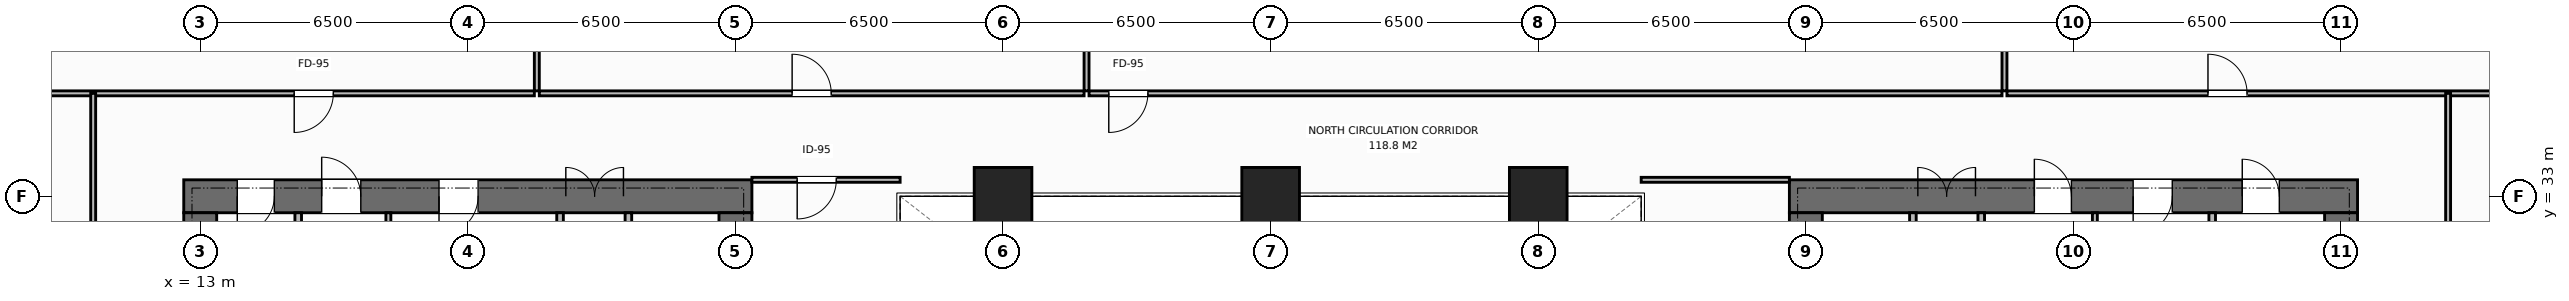
"""IFC4 building model, lengths in metres.
Left out: names, types, materials, properties, quantities, classifications, styles, units other than length and angle.
Written with IfcOpenShell. Run it as: python <this file> out.ifc"""

import sys

from ifc_helpers import new_model, si_unit, direction, frame, frame_2d, origin, origin_2d, place, context, subcontext, project, spatial, rectangle, extrude, element, fill, save


model = new_model("IFC4")
c1 = context("Model", 3, precision=1e-05, world=origin(), true_north=direction((0.0, 1.0)))
c2 = subcontext(c1, "Body", "Model", "MODEL_VIEW")
j1 = project(units=[si_unit("LENGTHUNIT", "METRE"), si_unit("PLANEANGLEUNIT", "RADIAN")], contexts=[c1])
p1 = place(None, origin())
s1 = spatial("IfcSite", under=j1, at=p1, CompositionType="ELEMENT")
p2 = place(p1, origin())
s2 = spatial("IfcBuilding", under=s1, at=p2, CompositionType="ELEMENT")
p3 = place(p2, frame((0.0, 0.0, 62.0)))
s3 = spatial("IfcBuildingStorey", under=s2, at=p3, CompositionType="ELEMENT", Elevation=62.0)
p4 = place(p3, frame((12.6, 33.0, 0.0), z_axis=(0.0, 0.0, 1.0), x_axis=(1.0, 0.0, 0.0)))
e1 = element("IfcWall", 1, at=p4, inside=s3, PredefinedType="SHEAR", context=c2, shape_type="SweptSolid", body=[
    extrude(rectangle(XDim=13.8, YDim=0.8, at=frame_2d((6.9, 0.0))), origin(), (0.0, 0.0, 1.0), 3.8),
])
p5 = place(p4, frame((1.3, 0.0, 0.0)))
e2 = element("IfcOpeningElement", 2, at=p5, cuts=e1, PredefinedType="OPENING", context=c2, shape_type="SweptSolid", body=[
    extrude(rectangle(XDim=0.9, YDim=2.15, at=frame_2d((0.45, 1.075))), frame((0.0, 0.41, 0.0), z_axis=(0.0, -1.0, 0.0), x_axis=(1.0, 0.0, 0.0)), (0.0, 0.0, 1.0), 0.82),
])
p6 = place(p4, frame((3.35, 0.0, 0.0)))
e3 = element("IfcOpeningElement", 3, at=p6, cuts=e1, PredefinedType="OPENING", context=c2, shape_type="SweptSolid", body=[
    extrude(rectangle(XDim=0.95, YDim=2.15, at=frame_2d((0.475, 1.075))), frame((0.0, 0.41, 0.0), z_axis=(0.0, -1.0, 0.0), x_axis=(1.0, 0.0, 0.0)), (0.0, 0.0, 1.0), 0.82),
])
p7 = place(p4, frame((6.2, 0.0, 0.0)))
e4 = element("IfcOpeningElement", 4, at=p7, cuts=e1, PredefinedType="OPENING", context=c2, shape_type="SweptSolid", body=[
    extrude(rectangle(XDim=0.95, YDim=2.15, at=frame_2d((0.475, 1.075))), frame((0.0, 0.41, 0.0), z_axis=(0.0, -1.0, 0.0), x_axis=(1.0, 0.0, 0.0)), (0.0, 0.0, 1.0), 0.82),
])
p8 = place(p4, frame((9.28, 0.0, 0.0)))
e5 = element("IfcOpeningElement", 5, at=p8, cuts=e1, PredefinedType="OPENING", context=c2, shape_type="SweptSolid", body=[
    extrude(rectangle(XDim=1.4, YDim=2.2, at=frame_2d((0.7, 1.1))), frame((0.0, 0.41, 0.0), z_axis=(0.0, -1.0, 0.0), x_axis=(1.0, 0.0, 0.0)), (0.0, 0.0, 1.0), 0.82),
])
p9 = place(p3, frame((13.0, 19.4, 0.0), z_axis=(0.0, 0.0, 1.0), x_axis=(0.0, 1.0, 0.0)))
e6 = element("IfcWall", 6, at=p9, inside=s3, PredefinedType="SHEAR", context=c2, shape_type="SweptSolid", body=[
    extrude(rectangle(XDim=13.2, YDim=0.8, at=frame_2d((6.6, 0.0))), origin(), (0.0, 0.0, 1.0), 3.8),
])
p10 = place(p9, frame((4.65, 0.0, 0.0)))
e7 = element("IfcOpeningElement", 7, at=p10, cuts=e6, PredefinedType="OPENING", context=c2, shape_type="SweptSolid", body=[
    extrude(rectangle(XDim=1.4, YDim=2.2, at=frame_2d((0.7, 1.1))), frame((0.0, 0.41, 0.0), z_axis=(0.0, -1.0, 0.0), x_axis=(1.0, 0.0, 0.0)), (0.0, 0.0, 1.0), 0.82),
])
p11 = place(p3, frame((26.0, 19.4, 0.0), z_axis=(0.0, 0.0, 1.0), x_axis=(0.0, 1.0, 0.0)))
e8 = element("IfcWall", 8, at=p11, inside=s3, PredefinedType="SHEAR", context=c2, shape_type="SweptSolid", body=[
    extrude(rectangle(XDim=13.2, YDim=0.8, at=frame_2d((6.6, 0.0))), origin(), (0.0, 0.0, 1.0), 3.8),
])
p12 = place(p3, frame((51.6, 33.0, 0.0), z_axis=(0.0, 0.0, 1.0), x_axis=(1.0, 0.0, 0.0)))
e9 = element("IfcWall", 9, at=p12, inside=s3, PredefinedType="SHEAR", context=c2, shape_type="SweptSolid", body=[
    extrude(rectangle(XDim=13.8, YDim=0.8, at=frame_2d((6.9, 0.0))), origin(), (0.0, 0.0, 1.0), 3.8),
])
p13 = place(p12, frame((3.12, 0.0, 0.0)))
e10 = element("IfcOpeningElement", 10, at=p13, cuts=e9, PredefinedType="OPENING", context=c2, shape_type="SweptSolid", body=[
    extrude(rectangle(XDim=1.4, YDim=2.2, at=frame_2d((0.7, 1.1))), frame((0.0, 0.41, 0.0), z_axis=(0.0, -1.0, 0.0), x_axis=(1.0, 0.0, 0.0)), (0.0, 0.0, 1.0), 0.82),
])
p14 = place(p12, frame((11.0, 0.0, 0.0)))
e11 = element("IfcOpeningElement", 11, at=p14, cuts=e9, PredefinedType="OPENING", context=c2, shape_type="SweptSolid", body=[
    extrude(rectangle(XDim=0.9, YDim=2.15, at=frame_2d((0.45, 1.075))), frame((0.0, 0.41, 0.0), z_axis=(0.0, -1.0, 0.0), x_axis=(1.0, 0.0, 0.0)), (0.0, 0.0, 1.0), 0.82),
])
p15 = place(p12, frame((5.95, 0.0, 0.0)))
e12 = element("IfcOpeningElement", 12, at=p15, cuts=e9, PredefinedType="OPENING", context=c2, shape_type="SweptSolid", body=[
    extrude(rectangle(XDim=0.9, YDim=2.15, at=frame_2d((0.45, 1.075))), frame((0.0, 0.41, 0.0), z_axis=(0.0, -1.0, 0.0), x_axis=(1.0, 0.0, 0.0)), (0.0, 0.0, 1.0), 0.82),
])
p16 = place(p12, frame((8.35, 0.0, 0.0)))
e13 = element("IfcOpeningElement", 13, at=p16, cuts=e9, PredefinedType="OPENING", context=c2, shape_type="SweptSolid", body=[
    extrude(rectangle(XDim=0.95, YDim=2.15, at=frame_2d((0.475, 1.075))), frame((0.0, 0.41, 0.0), z_axis=(0.0, -1.0, 0.0), x_axis=(1.0, 0.0, 0.0)), (0.0, 0.0, 1.0), 0.82),
])
p17 = place(p3, frame((52.0, 19.4, 0.0), z_axis=(0.0, 0.0, 1.0), x_axis=(0.0, 1.0, 0.0)))
e14 = element("IfcWall", 14, at=p17, inside=s3, PredefinedType="SHEAR", context=c2, shape_type="SweptSolid", body=[
    extrude(rectangle(XDim=13.2, YDim=0.8, at=frame_2d((6.6, 0.0))), origin(), (0.0, 0.0, 1.0), 3.8),
])
p18 = place(p3, frame((65.0, 19.4, 0.0), z_axis=(0.0, 0.0, 1.0), x_axis=(0.0, 1.0, 0.0)))
e15 = element("IfcWall", 15, at=p18, inside=s3, PredefinedType="SHEAR", context=c2, shape_type="SweptSolid", body=[
    extrude(rectangle(XDim=13.2, YDim=0.8, at=frame_2d((6.6, 0.0))), origin(), (0.0, 0.0, 1.0), 3.8),
])
p19 = place(p18, frame((8.05, 0.0, 0.0)))
e16 = element("IfcOpeningElement", 16, at=p19, cuts=e15, PredefinedType="OPENING", context=c2, shape_type="SweptSolid", body=[
    extrude(rectangle(XDim=1.3, YDim=2.2, at=frame_2d((0.65, 1.1))), frame((0.0, 0.41, 0.0), z_axis=(0.0, -1.0, 0.0), x_axis=(1.0, 0.0, 0.0)), (0.0, 0.0, 1.0), 0.82),
])
for number, where, z_axis, x_axis in (
    (17, (32.5, 33.0, 0.0), (0.0, 0.0, 1.0), (1.0, 0.0, 0.0)),
    (18, (39.0, 33.0, 0.0), (0.0, 0.0, 1.0), (1.0, 0.0, 0.0)),
    (19, (45.5, 33.0, 0.0), (0.0, 0.0, 1.0), (1.0, 0.0, 0.0)),
):
    element("IfcColumn", number, at=place(p3, frame(where, z_axis=z_axis, x_axis=x_axis)), inside=s3, PredefinedType="COLUMN", context=c2, shape_type="SweptSolid", body=[
        extrude(rectangle(XDim=1.4, YDim=1.4, at=origin_2d()), origin(), (0.0, 0.0, 1.0), 3.8),
    ])
p20 = place(p3, frame((15.38, 26.56, 0.0), z_axis=(0.0, 0.0, 1.0), x_axis=(0.0, 1.0, 0.0)))
e20 = element("IfcWall", 20, at=p20, inside=s3, PredefinedType="STANDARD", context=c2, shape_type="SweptSolid", body=[
    extrude(rectangle(XDim=6.04, YDim=0.16, at=frame_2d((3.02, 0.0))), origin(), (0.0, 0.0, 1.0), 3.55),
])
p21 = place(p3, frame((17.57, 26.56, 0.0), z_axis=(0.0, 0.0, 1.0), x_axis=(0.0, 1.0, 0.0)))
e21 = element("IfcWall", 21, at=p21, inside=s3, PredefinedType="PARTITIONING", context=c2, shape_type="SweptSolid", body=[
    extrude(rectangle(XDim=6.04, YDim=0.12, at=frame_2d((3.02, 0.0))), origin(), (0.0, 0.0, 1.0), 3.55),
])
p22 = place(p3, frame((21.74, 26.56, 0.0), z_axis=(0.0, 0.0, 1.0), x_axis=(0.0, 1.0, 0.0)))
e22 = element("IfcWall", 22, at=p22, inside=s3, PredefinedType="STANDARD", context=c2, shape_type="SweptSolid", body=[
    extrude(rectangle(XDim=6.04, YDim=0.16, at=frame_2d((3.02, 0.0))), origin(), (0.0, 0.0, 1.0), 3.55),
])
p23 = place(p3, frame((23.4, 19.4, 0.0), z_axis=(0.0, 0.0, 1.0), x_axis=(0.0, 1.0, 0.0)))
e23 = element("IfcWall", 23, at=p23, inside=s3, PredefinedType="STANDARD", context=c2, shape_type="SweptSolid", body=[
    extrude(rectangle(XDim=13.2, YDim=0.16, at=frame_2d((6.6, 0.0))), origin(), (0.0, 0.0, 1.0), 3.55),
])
p24 = place(p23, frame((0.55, 0.0, 0.0)))
e24 = element("IfcOpeningElement", 24, at=p24, cuts=e23, PredefinedType="OPENING", context=c2, shape_type="SweptSolid", body=[
    extrude(rectangle(XDim=1.1, YDim=2.2, at=frame_2d((0.55, 1.1))), frame((0.0, 0.09, 0.0), z_axis=(0.0, -1.0, 0.0), x_axis=(1.0, 0.0, 0.0)), (0.0, 0.0, 1.0), 0.18),
])
p25 = place(p23, frame((2.7, 0.0, 0.0)))
e25 = element("IfcOpeningElement", 25, at=p25, cuts=e23, PredefinedType="OPENING", context=c2, shape_type="SweptSolid", body=[
    extrude(rectangle(XDim=1.1, YDim=2.2, at=frame_2d((0.55, 1.1))), frame((0.0, 0.09, 0.0), z_axis=(0.0, -1.0, 0.0), x_axis=(1.0, 0.0, 0.0)), (0.0, 0.0, 1.0), 0.18),
])
p26 = place(p3, frame((54.6, 19.4, 0.0), z_axis=(0.0, 0.0, 1.0), x_axis=(0.0, 1.0, 0.0)))
e26 = element("IfcWall", 26, at=p26, inside=s3, PredefinedType="STANDARD", context=c2, shape_type="SweptSolid", body=[
    extrude(rectangle(XDim=13.2, YDim=0.16, at=frame_2d((6.6, 0.0))), origin(), (0.0, 0.0, 1.0), 3.55),
])
p27 = place(p26, frame((0.55, 0.0, 0.0)))
e27 = element("IfcOpeningElement", 27, at=p27, cuts=e26, PredefinedType="OPENING", context=c2, shape_type="SweptSolid", body=[
    extrude(rectangle(XDim=1.1, YDim=2.2, at=frame_2d((0.55, 1.1))), frame((0.0, 0.09, 0.0), z_axis=(0.0, -1.0, 0.0), x_axis=(1.0, 0.0, 0.0)), (0.0, 0.0, 1.0), 0.18),
])
p28 = place(p26, frame((2.7, 0.0, 0.0)))
e28 = element("IfcOpeningElement", 28, at=p28, cuts=e26, PredefinedType="OPENING", context=c2, shape_type="SweptSolid", body=[
    extrude(rectangle(XDim=1.1, YDim=2.2, at=frame_2d((0.55, 1.1))), frame((0.0, 0.09, 0.0), z_axis=(0.0, -1.0, 0.0), x_axis=(1.0, 0.0, 0.0)), (0.0, 0.0, 1.0), 0.18),
])
p29 = place(p3, frame((56.26, 23.09, 0.0), z_axis=(0.0, 0.0, 1.0), x_axis=(0.0, 1.0, 0.0)))
e29 = element("IfcWall", 29, at=p29, inside=s3, PredefinedType="STANDARD", context=c2, shape_type="SweptSolid", body=[
    extrude(rectangle(XDim=9.51, YDim=0.16, at=frame_2d((4.755, 0.0))), origin(), (0.0, 0.0, 1.0), 3.55),
])
p30 = place(p29, frame((1.01, 0.0, 0.0)))
e30 = element("IfcOpeningElement", 30, at=p30, cuts=e29, PredefinedType="OPENING", context=c2, shape_type="SweptSolid", body=[
    extrude(rectangle(XDim=1.3, YDim=2.2, at=frame_2d((0.65, 1.1))), frame((0.0, 0.09, 0.0), z_axis=(0.0, -1.0, 0.0), x_axis=(1.0, 0.0, 0.0)), (0.0, 0.0, 1.0), 0.18),
])
p31 = place(p3, frame((61.87, 26.56, 0.0), z_axis=(0.0, 0.0, 1.0), x_axis=(0.0, 1.0, 0.0)))
e31 = element("IfcWall", 31, at=p31, inside=s3, PredefinedType="STANDARD", context=c2, shape_type="SweptSolid", body=[
    extrude(rectangle(XDim=6.04, YDim=0.16, at=frame_2d((3.02, 0.0))), origin(), (0.0, 0.0, 1.0), 3.55),
])
p32 = place(p3, frame((59.02, 26.56, 0.0), z_axis=(0.0, 0.0, 1.0), x_axis=(0.0, 1.0, 0.0)))
e32 = element("IfcWall", 32, at=p32, inside=s3, PredefinedType="PARTITIONING", context=c2, shape_type="SweptSolid", body=[
    extrude(rectangle(XDim=6.04, YDim=0.12, at=frame_2d((3.02, 0.0))), origin(), (0.0, 0.0, 1.0), 3.55),
])
p33 = place(p3, frame((26.4, 33.4, 0.0), z_axis=(0.0, 0.0, 1.0), x_axis=(1.0, 0.0, 0.0)))
e33 = element("IfcWall", 33, at=p33, inside=s3, PredefinedType="PARTITIONING", context=c2, shape_type="SweptSolid", body=[
    extrude(rectangle(XDim=3.6, YDim=0.12, at=frame_2d((1.8, 0.0))), origin(), (0.0, 0.0, 1.0), 3.55),
])
p34 = place(p33, frame((1.1, 0.0, 0.0)))
e34 = element("IfcOpeningElement", 34, at=p34, cuts=e33, PredefinedType="OPENING", context=c2, shape_type="SweptSolid", body=[
    extrude(rectangle(XDim=0.95, YDim=2.15, at=frame_2d((0.475, 1.075))), frame((0.0, 0.07, 0.0), z_axis=(0.0, -1.0, 0.0), x_axis=(1.0, 0.0, 0.0)), (0.0, 0.0, 1.0), 0.14),
])
p35 = place(p3, frame((48.0, 33.4, 0.0), z_axis=(0.0, 0.0, 1.0), x_axis=(1.0, 0.0, 0.0)))
e35 = element("IfcWall", 35, at=p35, inside=s3, PredefinedType="PARTITIONING", context=c2, shape_type="SweptSolid", body=[
    extrude(rectangle(XDim=3.6, YDim=0.12, at=frame_2d((1.8, 0.0))), origin(), (0.0, 0.0, 1.0), 3.55),
])
p36 = place(p3, frame((21.176, 35.56, 0.0), z_axis=(0.0, 0.0, 1.0), x_axis=(0.0, 1.0, 0.0)))
e36 = element("IfcWall", 36, at=p36, inside=s3, PredefinedType="PARTITIONING", context=c2, shape_type="SweptSolid", body=[
    extrude(rectangle(XDim=16.42, YDim=0.12, at=frame_2d((8.21, 0.0))), origin(), (0.0, 0.0, 1.0), 3.55),
])
p37 = place(p3, frame((-0.02, 35.5, 0.0), z_axis=(0.0, 0.0, 1.0), x_axis=(1.0, 0.0, 0.0)))
e37 = element("IfcWall", 37, at=p37, inside=s3, PredefinedType="PARTITIONING", context=c2, shape_type="SweptSolid", body=[
    extrude(rectangle(XDim=21.136, YDim=0.12, at=frame_2d((10.568, 0.0))), origin(), (0.0, 0.0, 1.0), 3.55),
])
p38 = place(p37, frame((15.303, 0.0, 0.0)))
e38 = element("IfcOpeningElement", 38, at=p38, cuts=e37, PredefinedType="OPENING", context=c2, shape_type="SweptSolid", body=[
    extrude(rectangle(XDim=0.95, YDim=2.15, at=frame_2d((0.475, 1.075))), frame((0.0, 0.07, 0.0), z_axis=(0.0, -1.0, 0.0), x_axis=(1.0, 0.0, 0.0)), (0.0, 0.0, 1.0), 0.14),
])
p39 = place(p3, frame((34.528, 35.56, 0.0), z_axis=(0.0, 0.0, 1.0), x_axis=(0.0, 1.0, 0.0)))
e39 = element("IfcWall", 39, at=p39, inside=s3, PredefinedType="PARTITIONING", context=c2, shape_type="SweptSolid", body=[
    extrude(rectangle(XDim=16.42, YDim=0.12, at=frame_2d((8.21, 0.0))), origin(), (0.0, 0.0, 1.0), 3.55),
])
p40 = place(p3, frame((21.236, 35.5, 0.0), z_axis=(0.0, 0.0, 1.0), x_axis=(1.0, 0.0, 0.0)))
e40 = element("IfcWall", 40, at=p40, inside=s3, PredefinedType="PARTITIONING", context=c2, shape_type="SweptSolid", body=[
    extrude(rectangle(XDim=13.233, YDim=0.12, at=frame_2d((6.616, 0.0))), origin(), (0.0, 0.0, 1.0), 3.55),
])
p41 = place(p40, frame((6.141, 0.0, 0.0)))
e41 = element("IfcOpeningElement", 41, at=p41, cuts=e40, PredefinedType="OPENING", context=c2, shape_type="SweptSolid", body=[
    extrude(rectangle(XDim=0.95, YDim=2.15, at=frame_2d((0.475, 1.075))), frame((0.0, 0.07, 0.0), z_axis=(0.0, -1.0, 0.0), x_axis=(1.0, 0.0, 0.0)), (0.0, 0.0, 1.0), 0.14),
])
p42 = place(p3, frame((56.824, 35.56, 0.0), z_axis=(0.0, 0.0, 1.0), x_axis=(0.0, 1.0, 0.0)))
e42 = element("IfcWall", 42, at=p42, inside=s3, PredefinedType="PARTITIONING", context=c2, shape_type="SweptSolid", body=[
    extrude(rectangle(XDim=16.42, YDim=0.12, at=frame_2d((8.21, 0.0))), origin(), (0.0, 0.0, 1.0), 3.55),
])
p43 = place(p3, frame((34.588, 35.5, 0.0), z_axis=(0.0, 0.0, 1.0), x_axis=(1.0, 0.0, 0.0)))
e43 = element("IfcWall", 43, at=p43, inside=s3, PredefinedType="PARTITIONING", context=c2, shape_type="SweptSolid", body=[
    extrude(rectangle(XDim=22.176, YDim=0.12, at=frame_2d((11.088, 0.0))), origin(), (0.0, 0.0, 1.0), 3.55),
])
p44 = place(p43, frame((0.48, 0.0, 0.0)))
e44 = element("IfcOpeningElement", 44, at=p44, cuts=e43, PredefinedType="OPENING", context=c2, shape_type="SweptSolid", body=[
    extrude(rectangle(XDim=0.95, YDim=2.15, at=frame_2d((0.475, 1.075))), frame((0.0, 0.07, 0.0), z_axis=(0.0, -1.0, 0.0), x_axis=(1.0, 0.0, 0.0)), (0.0, 0.0, 1.0), 0.14),
])
p45 = place(p3, frame((56.884, 35.5, 0.0), z_axis=(0.0, 0.0, 1.0), x_axis=(1.0, 0.0, 0.0)))
e45 = element("IfcWall", 45, at=p45, inside=s3, PredefinedType="PARTITIONING", context=c2, shape_type="SweptSolid", body=[
    extrude(rectangle(XDim=21.136, YDim=0.12, at=frame_2d((10.568, 0.0))), origin(), (0.0, 0.0, 1.0), 3.55),
])
p46 = place(p45, frame((4.883, 0.0, 0.0)))
e46 = element("IfcOpeningElement", 46, at=p46, cuts=e45, PredefinedType="OPENING", context=c2, shape_type="SweptSolid", body=[
    extrude(rectangle(XDim=0.95, YDim=2.15, at=frame_2d((0.475, 1.075))), frame((0.0, 0.07, 0.0), z_axis=(0.0, -1.0, 0.0), x_axis=(1.0, 0.0, 0.0)), (0.0, 0.0, 1.0), 0.14),
])
p47 = place(p3, frame((10.4, 18.6, 0.0), z_axis=(0.0, 0.0, 1.0), x_axis=(0.0, 1.0, 0.0)))
e47 = element("IfcWall", 47, at=p47, inside=s3, PredefinedType="PARTITIONING", context=c2, shape_type="SweptSolid", body=[
    extrude(rectangle(XDim=16.9, YDim=0.12, at=frame_2d((8.45, 0.0))), origin(), (0.0, 0.0, 1.0), 3.55),
])
p48 = place(p47, frame((6.925, 0.0, 0.0)))
e48 = element("IfcOpeningElement", 48, at=p48, cuts=e47, PredefinedType="OPENING", context=c2, shape_type="SweptSolid", body=[
    extrude(rectangle(XDim=0.95, YDim=2.15, at=frame_2d((0.475, 1.075))), frame((0.0, 0.07, 0.0), z_axis=(0.0, -1.0, 0.0), x_axis=(1.0, 0.0, 0.0)), (0.0, 0.0, 1.0), 0.14),
])
p49 = place(p3, frame((67.6, 26.0, 0.0), z_axis=(0.0, 0.0, 1.0), x_axis=(0.0, 1.0, 0.0)))
e49 = element("IfcWall", 49, at=p49, inside=s3, PredefinedType="PARTITIONING", context=c2, shape_type="SweptSolid", body=[
    extrude(rectangle(XDim=9.5, YDim=0.12, at=frame_2d((4.75, 0.0))), origin(), (0.0, 0.0, 1.0), 3.55),
])
p50 = place(p49, frame((3.225, 0.0, 0.0)))
e50 = element("IfcOpeningElement", 50, at=p50, cuts=e49, PredefinedType="OPENING", context=c2, shape_type="SweptSolid", body=[
    extrude(rectangle(XDim=0.95, YDim=2.15, at=frame_2d((0.475, 1.075))), frame((0.0, 0.07, 0.0), z_axis=(0.0, -1.0, 0.0), x_axis=(1.0, 0.0, 0.0)), (0.0, 0.0, 1.0), 0.14),
])
p51 = place(p5, origin())
e51 = element("IfcDoor", 51, at=p51, inside=s3, OperationType="SINGLE_SWING_RIGHT", PredefinedType="DOOR", context=c2, shape_type="SweptSolid", body=[
    extrude(rectangle(XDim=0.9, YDim=2.15, at=frame_2d((0.45, 1.075))), frame((0.0, -0.075, 0.0), z_axis=(0.0, -1.0, 0.0), x_axis=(1.0, 0.0, 0.0)), (0.0, 0.0, 1.0), 0.05),
])
fill(e2, e51)
p52 = place(p6, origin())
e52 = element("IfcDoor", 52, at=p52, inside=s3, OperationType="SINGLE_SWING_LEFT", PredefinedType="DOOR", context=c2, shape_type="SweptSolid", body=[
    extrude(rectangle(XDim=0.95, YDim=2.15, at=frame_2d((0.475, 1.075))), frame((0.0, -0.075, 0.0), z_axis=(0.0, -1.0, 0.0), x_axis=(1.0, 0.0, 0.0)), (0.0, 0.0, 1.0), 0.05),
])
fill(e3, e52)
p53 = place(p7, origin())
e53 = element("IfcDoor", 53, at=p53, inside=s3, OperationType="SINGLE_SWING_RIGHT", PredefinedType="DOOR", context=c2, shape_type="SweptSolid", body=[
    extrude(rectangle(XDim=0.95, YDim=2.15, at=frame_2d((0.475, 1.075))), frame((0.0, -0.075, 0.0), z_axis=(0.0, -1.0, 0.0), x_axis=(1.0, 0.0, 0.0)), (0.0, 0.0, 1.0), 0.05),
])
fill(e4, e53)
p54 = place(p8, origin())
e54 = element("IfcDoor", 54, at=p54, inside=s3, OperationType="DOUBLE_DOOR_SINGLE_SWING", PredefinedType="DOOR", context=c2, shape_type="SweptSolid", body=[
    extrude(rectangle(XDim=1.4, YDim=2.2, at=frame_2d((0.7, 1.1))), frame((0.0, -0.075, 0.0), z_axis=(0.0, -1.0, 0.0), x_axis=(1.0, 0.0, 0.0)), (0.0, 0.0, 1.0), 0.05),
])
fill(e5, e54)
p55 = place(p13, origin())
e55 = element("IfcDoor", 55, at=p55, inside=s3, OperationType="DOUBLE_DOOR_SINGLE_SWING", PredefinedType="DOOR", context=c2, shape_type="SweptSolid", body=[
    extrude(rectangle(XDim=1.4, YDim=2.2, at=frame_2d((0.7, 1.1))), frame((0.0, -0.075, 0.0), z_axis=(0.0, -1.0, 0.0), x_axis=(1.0, 0.0, 0.0)), (0.0, 0.0, 1.0), 0.05),
])
fill(e10, e55)
p56 = place(p14, origin())
e56 = element("IfcDoor", 56, at=p56, inside=s3, OperationType="SINGLE_SWING_LEFT", PredefinedType="DOOR", context=c2, shape_type="SweptSolid", body=[
    extrude(rectangle(XDim=0.9, YDim=2.15, at=frame_2d((0.45, 1.075))), frame((0.0, -0.075, 0.0), z_axis=(0.0, -1.0, 0.0), x_axis=(1.0, 0.0, 0.0)), (0.0, 0.0, 1.0), 0.05),
])
fill(e11, e56)
p57 = place(p15, origin())
e57 = element("IfcDoor", 57, at=p57, inside=s3, OperationType="SINGLE_SWING_LEFT", PredefinedType="DOOR", context=c2, shape_type="SweptSolid", body=[
    extrude(rectangle(XDim=0.9, YDim=2.15, at=frame_2d((0.45, 1.075))), frame((0.0, -0.075, 0.0), z_axis=(0.0, -1.0, 0.0), x_axis=(1.0, 0.0, 0.0)), (0.0, 0.0, 1.0), 0.05),
])
fill(e12, e57)
p58 = place(p16, origin())
e58 = element("IfcDoor", 58, at=p58, inside=s3, OperationType="SINGLE_SWING_RIGHT", PredefinedType="DOOR", context=c2, shape_type="SweptSolid", body=[
    extrude(rectangle(XDim=0.95, YDim=2.15, at=frame_2d((0.475, 1.075))), frame((0.0, -0.075, 0.0), z_axis=(0.0, -1.0, 0.0), x_axis=(1.0, 0.0, 0.0)), (0.0, 0.0, 1.0), 0.05),
])
fill(e13, e58)
p59 = place(p34, origin())
e59 = element("IfcDoor", 59, at=p59, inside=s3, OperationType="SINGLE_SWING_RIGHT", PredefinedType="DOOR", context=c2, shape_type="SweptSolid", body=[
    extrude(rectangle(XDim=0.95, YDim=2.15, at=frame_2d((0.475, 1.075))), frame((0.0, 0.025, 0.0), z_axis=(0.0, -1.0, 0.0), x_axis=(1.0, 0.0, 0.0)), (0.0, 0.0, 1.0), 0.05),
])
fill(e34, e59)
p60 = place(p38, origin())
e60 = element("IfcDoor", 60, at=p60, inside=s3, OperationType="SINGLE_SWING_RIGHT", PredefinedType="DOOR", context=c2, shape_type="SweptSolid", body=[
    extrude(rectangle(XDim=0.95, YDim=2.15, at=frame_2d((0.475, 1.075))), frame((0.0, 0.025, 0.0), z_axis=(0.0, -1.0, 0.0), x_axis=(1.0, 0.0, 0.0)), (0.0, 0.0, 1.0), 0.05),
])
fill(e38, e60)
p61 = place(p41, origin())
e61 = element("IfcDoor", 61, at=p61, inside=s3, OperationType="SINGLE_SWING_LEFT", PredefinedType="DOOR", context=c2, shape_type="SweptSolid", body=[
    extrude(rectangle(XDim=0.95, YDim=2.15, at=frame_2d((0.475, 1.075))), frame((0.0, 0.025, 0.0), z_axis=(0.0, -1.0, 0.0), x_axis=(1.0, 0.0, 0.0)), (0.0, 0.0, 1.0), 0.05),
])
fill(e41, e61)
p62 = place(p44, origin())
e62 = element("IfcDoor", 62, at=p62, inside=s3, OperationType="SINGLE_SWING_RIGHT", PredefinedType="DOOR", context=c2, shape_type="SweptSolid", body=[
    extrude(rectangle(XDim=0.95, YDim=2.15, at=frame_2d((0.475, 1.075))), frame((0.0, 0.025, 0.0), z_axis=(0.0, -1.0, 0.0), x_axis=(1.0, 0.0, 0.0)), (0.0, 0.0, 1.0), 0.05),
])
fill(e44, e62)
p63 = place(p46, origin())
e63 = element("IfcDoor", 63, at=p63, inside=s3, OperationType="SINGLE_SWING_LEFT", PredefinedType="DOOR", context=c2, shape_type="SweptSolid", body=[
    extrude(rectangle(XDim=0.95, YDim=2.15, at=frame_2d((0.475, 1.075))), frame((0.0, 0.025, 0.0), z_axis=(0.0, -1.0, 0.0), x_axis=(1.0, 0.0, 0.0)), (0.0, 0.0, 1.0), 0.05),
])
fill(e46, e63)
save(model, sys.argv[1])
